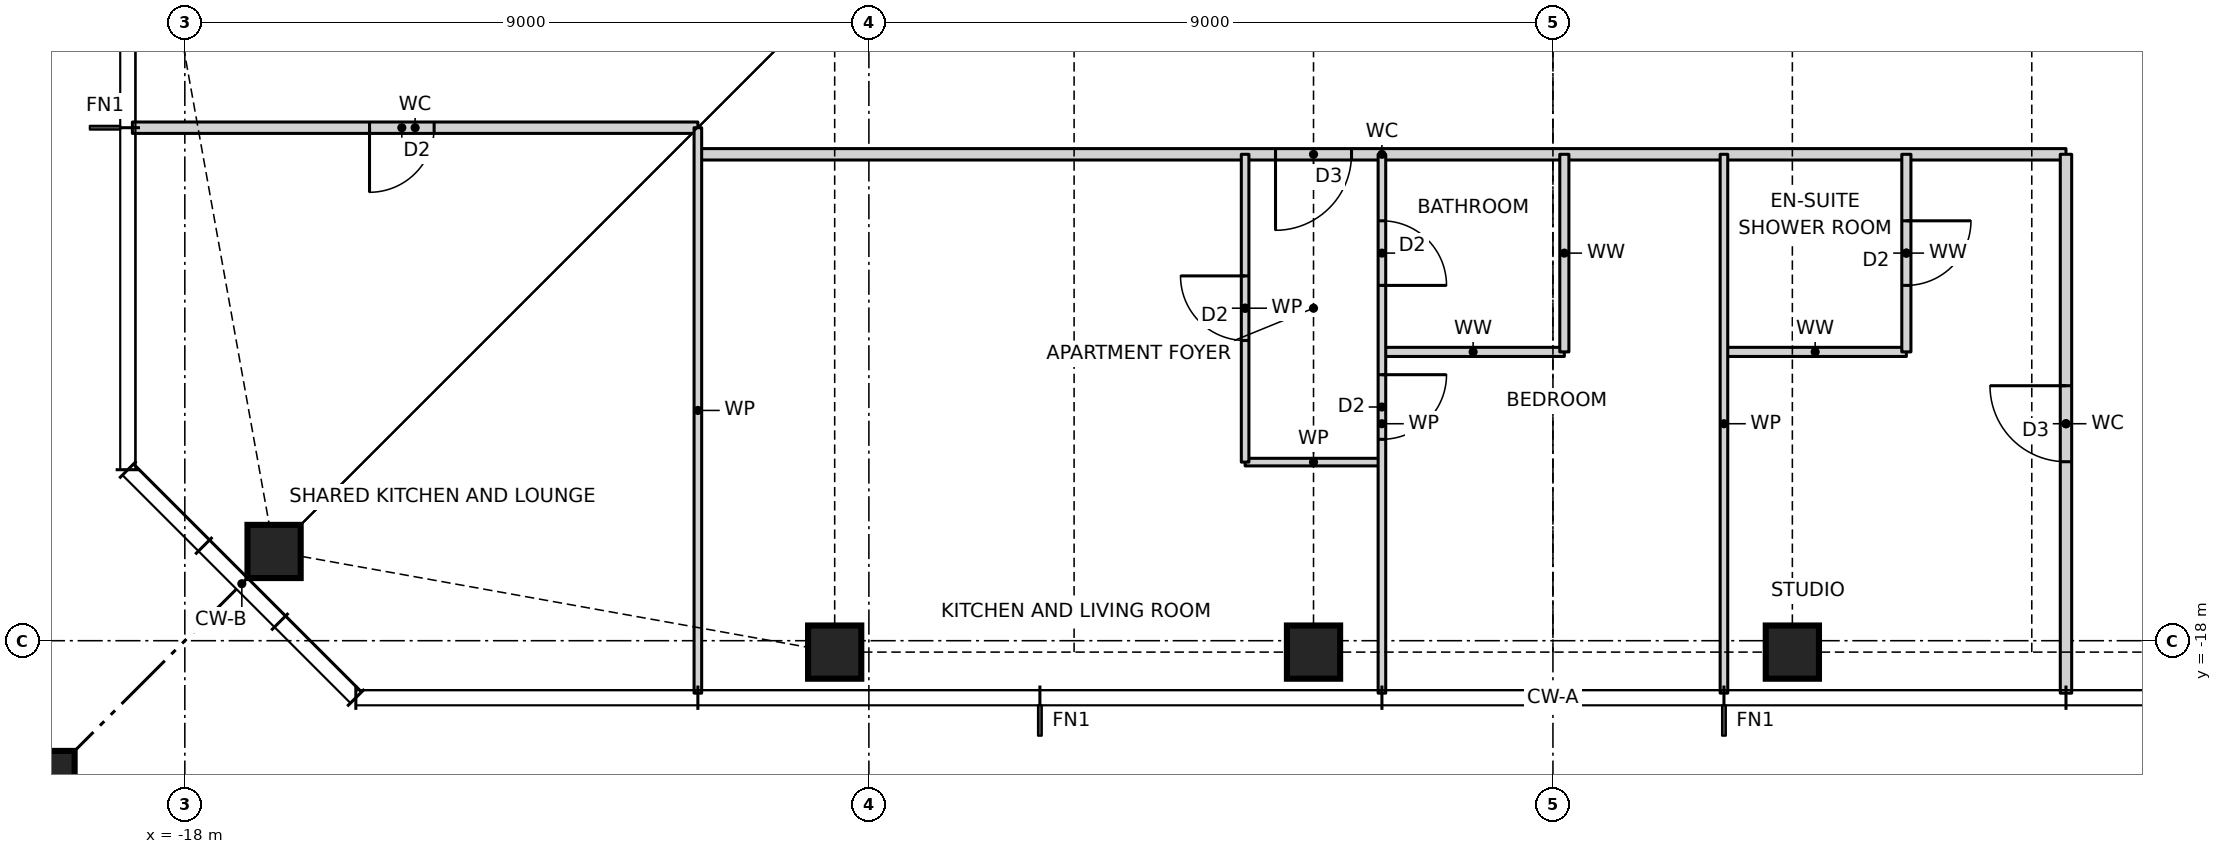
"""IFC4 building model, lengths in metres.
Left out: names, types, materials, properties, quantities, classifications, styles, units other than length and angle.
Written with IfcOpenShell. Run it as: python <this file> out.ifc"""

import sys

from ifc_helpers import new_model, si_unit, direction, frame, frame_2d, origin, origin_2d, place, context, subcontext, project, spatial, rectangle, hollow_rectangle, i_section, extrude, element, fill, save


model = new_model("IFC4")
c1 = context("Model", 3, precision=1e-05, world=origin(), true_north=direction((0.0, 1.0)))
c2 = subcontext(c1, "Body", "Model", "MODEL_VIEW")
j1 = project(units=[si_unit("LENGTHUNIT", "METRE"), si_unit("PLANEANGLEUNIT", "RADIAN")], contexts=[c1])
p1 = place(None, origin())
s1 = spatial("IfcSite", under=j1, at=p1, CompositionType="ELEMENT")
p2 = place(p1, origin())
s2 = spatial("IfcBuilding", under=s1, at=p2, CompositionType="ELEMENT")
p3 = place(p2, frame((0.0, 0.0, 167.0)))
s3 = spatial("IfcBuildingStorey", under=s2, at=p3, CompositionType="ELEMENT", Elevation=167.0)
for number, where, z_axis, x_axis in (
    (1, (-16.826, -16.826, 0.0), (0.0, 0.0, 1.0), (1.0, 0.0, 0.0)),
    (2, (-9.45, -18.15, 0.0), (0.0, 0.0, 1.0), (1.0, 0.0, 0.0)),
    (3, (-3.15, -18.15, 0.0), (0.0, 0.0, 1.0), (1.0, 0.0, 0.0)),
    (4, (3.15, -18.15, 0.0), (0.0, 0.0, 1.0), (1.0, 0.0, 0.0)),
):
    element("IfcColumn", number, at=place(p3, frame(where, z_axis=z_axis, x_axis=x_axis)), inside=s3, PredefinedType="COLUMN", context=c2, shape_type="SweptSolid", body=[
        extrude(hollow_rectangle(XDim=0.7, YDim=0.7, WallThickness=0.06, at=origin_2d()), origin(), (0.0, 0.0, 1.0), 3.5),
    ])
p4 = place(p3, frame((-21.65, -21.65, 0.0), z_axis=(0.0, 0.0, 1.0), x_axis=(1.0, 0.0, 0.0)))
e5 = element("IfcColumn", 5, at=p4, inside=s3, PredefinedType="COLUMN", context=c2, shape_type="SweptSolid", body=[
    extrude(rectangle(XDim=4.4, YDim=4.4, at=origin_2d()), origin(), (0.0, 0.0, 1.0), 3.5),
    extrude(i_section(OverallWidth=0.478, OverallDepth=0.599, WebThickness=0.1, FlangeThickness=0.14, at=origin_2d()), origin(), (0.0, 0.0, 1.0), 3.5),
])
p5 = place(p3, frame((-4.05, -15.65, 0.0), z_axis=(0.0, 0.0, 1.0), x_axis=(1.0, 0.0, 0.0)))
e6 = element("IfcWall", 6, at=p5, inside=s3, PredefinedType="PARTITIONING", context=c2, shape_type="SweptSolid", body=[
    extrude(rectangle(XDim=1.8, YDim=0.1, at=frame_2d((0.9, 0.0))), origin(), (0.0, 0.0, 1.0), 3.27),
])
for number, where, z_axis, x_axis in (
    (7, (-2.25, -14.2, 0.0), (0.0, 0.0, 1.0), (1.0, 0.0, 0.0)),
    (8, (2.25, -14.2, 0.0), (0.0, 0.0, 1.0), (1.0, 0.0, 0.0)),
):
    element("IfcWall", number, at=place(p3, frame(where, z_axis=z_axis, x_axis=x_axis)), inside=s3, PredefinedType="PARTITIONING", context=c2, shape_type="SweptSolid", body=[
        extrude(rectangle(XDim=2.4, YDim=0.12, at=frame_2d((1.2, 0.0))), origin(), (0.0, 0.0, 1.0), 3.27),
    ])
p6 = place(p3, frame((-11.25, -11.6, 0.0), z_axis=(0.0, 0.0, 1.0), x_axis=(1.0, 0.0, 0.0)))
e9 = element("IfcWall", 9, at=p6, inside=s3, PredefinedType="PARTITIONING", context=c2, shape_type="SweptSolid", body=[
    extrude(rectangle(XDim=18.0, YDim=0.15, at=frame_2d((9.0, 0.0))), origin(), (0.0, 0.0, 1.0), 3.27),
])
p7 = place(p6, frame((7.6, 0.0, 0.0)))
e10 = element("IfcOpeningElement", 10, at=p7, cuts=e9, PredefinedType="OPENING", context=c2, shape_type="SweptSolid", body=[
    extrude(rectangle(XDim=1.0, YDim=2.1, at=frame_2d((0.5, 1.05))), frame((0.0, 0.085, 0.0), z_axis=(0.0, -1.0, 0.0), x_axis=(1.0, 0.0, 0.0)), (0.0, 0.0, 1.0), 0.17),
])
p8 = place(p3, frame((-18.69, -11.25, 0.0), z_axis=(0.0, 0.0, 1.0), x_axis=(1.0, 0.0, 0.0)))
e11 = element("IfcWall", 11, at=p8, inside=s3, PredefinedType="PARTITIONING", context=c2, shape_type="SweptSolid", body=[
    extrude(rectangle(XDim=7.44, YDim=0.15, at=frame_2d((3.72, 0.0))), origin(), (0.0, 0.0, 1.0), 3.27),
])
p9 = place(p8, frame((3.12, 0.0, 0.0)))
e12 = element("IfcOpeningElement", 12, at=p9, cuts=e11, PredefinedType="OPENING", context=c2, shape_type="SweptSolid", body=[
    extrude(rectangle(XDim=0.85, YDim=2.1, at=frame_2d((0.425, 1.05))), frame((0.0, 0.085, 0.0), z_axis=(0.0, -1.0, 0.0), x_axis=(1.0, 0.0, 0.0)), (0.0, 0.0, 1.0), 0.17),
])
p10 = place(p3, frame((6.75, -18.69, 0.0), z_axis=(0.0, 0.0, 1.0), x_axis=(0.0, 1.0, 0.0)))
e13 = element("IfcWall", 13, at=p10, inside=s3, PredefinedType="PARTITIONING", context=c2, shape_type="SweptSolid", body=[
    extrude(rectangle(XDim=7.09, YDim=0.15, at=frame_2d((3.545, 0.0))), origin(), (0.0, 0.0, 1.0), 3.27),
])
p11 = place(p10, frame((3.045, 0.0, 0.0)))
e14 = element("IfcOpeningElement", 14, at=p11, cuts=e13, PredefinedType="OPENING", context=c2, shape_type="SweptSolid", body=[
    extrude(rectangle(XDim=1.0, YDim=2.1, at=frame_2d((0.5, 1.05))), frame((0.0, 0.085, 0.0), z_axis=(0.0, -1.0, 0.0), x_axis=(1.0, 0.0, 0.0)), (0.0, 0.0, 1.0), 0.17),
])
p12 = place(p3, frame((4.65, -14.2, 0.0), z_axis=(0.0, 0.0, 1.0), x_axis=(0.0, 1.0, 0.0)))
e15 = element("IfcWall", 15, at=p12, inside=s3, PredefinedType="PARTITIONING", context=c2, shape_type="SweptSolid", body=[
    extrude(rectangle(XDim=2.6, YDim=0.12, at=frame_2d((1.3, 0.0))), origin(), (0.0, 0.0, 1.0), 3.27),
])
p13 = place(p12, frame((0.875, 0.0, 0.0)))
e16 = element("IfcOpeningElement", 16, at=p13, cuts=e15, PredefinedType="OPENING", context=c2, shape_type="SweptSolid", body=[
    extrude(rectangle(XDim=0.85, YDim=2.1, at=frame_2d((0.425, 1.05))), frame((0.0, 0.07, 0.0), z_axis=(0.0, -1.0, 0.0), x_axis=(1.0, 0.0, 0.0)), (0.0, 0.0, 1.0), 0.14),
])
p14 = place(p3, frame((2.25, -18.69, 0.0), z_axis=(0.0, 0.0, 1.0), x_axis=(0.0, 1.0, 0.0)))
e17 = element("IfcWall", 17, at=p14, inside=s3, PredefinedType="PARTITIONING", context=c2, shape_type="SweptSolid", body=[
    extrude(rectangle(XDim=7.09, YDim=0.1, at=frame_2d((3.545, 0.0))), origin(), (0.0, 0.0, 1.0), 3.27),
])
p15 = place(p3, frame((0.15, -14.2, 0.0), z_axis=(0.0, 0.0, 1.0), x_axis=(0.0, 1.0, 0.0)))
e18 = element("IfcWall", 18, at=p15, inside=s3, PredefinedType="PARTITIONING", context=c2, shape_type="SweptSolid", body=[
    extrude(rectangle(XDim=2.6, YDim=0.12, at=frame_2d((1.3, 0.0))), origin(), (0.0, 0.0, 1.0), 3.27),
])
p16 = place(p3, frame((-2.25, -18.69, 0.0), z_axis=(0.0, 0.0, 1.0), x_axis=(0.0, 1.0, 0.0)))
e19 = element("IfcWall", 19, at=p16, inside=s3, PredefinedType="PARTITIONING", context=c2, shape_type="SweptSolid", body=[
    extrude(rectangle(XDim=7.09, YDim=0.1, at=frame_2d((3.545, 0.0))), origin(), (0.0, 0.0, 1.0), 3.27),
])
p17 = place(p16, frame((3.34, 0.0, 0.0)))
e20 = element("IfcOpeningElement", 20, at=p17, cuts=e19, PredefinedType="OPENING", context=c2, shape_type="SweptSolid", body=[
    extrude(rectangle(XDim=0.85, YDim=2.1, at=frame_2d((0.425, 1.05))), frame((0.0, 0.06, 0.0), z_axis=(0.0, -1.0, 0.0), x_axis=(1.0, 0.0, 0.0)), (0.0, 0.0, 1.0), 0.12),
])
p18 = place(p16, frame((5.365, 0.0, 0.0)))
e21 = element("IfcOpeningElement", 21, at=p18, cuts=e19, PredefinedType="OPENING", context=c2, shape_type="SweptSolid", body=[
    extrude(rectangle(XDim=0.85, YDim=2.1, at=frame_2d((0.425, 1.05))), frame((0.0, 0.06, 0.0), z_axis=(0.0, -1.0, 0.0), x_axis=(1.0, 0.0, 0.0)), (0.0, 0.0, 1.0), 0.12),
])
p19 = place(p3, frame((-4.05, -15.65, 0.0), z_axis=(0.0, 0.0, 1.0), x_axis=(0.0, 1.0, 0.0)))
e22 = element("IfcWall", 22, at=p19, inside=s3, PredefinedType="PARTITIONING", context=c2, shape_type="SweptSolid", body=[
    extrude(rectangle(XDim=4.05, YDim=0.1, at=frame_2d((2.025, 0.0))), origin(), (0.0, 0.0, 1.0), 3.27),
])
p20 = place(p19, frame((1.6, 0.0, 0.0)))
e23 = element("IfcOpeningElement", 23, at=p20, cuts=e22, PredefinedType="OPENING", context=c2, shape_type="SweptSolid", body=[
    extrude(rectangle(XDim=0.85, YDim=2.1, at=frame_2d((0.425, 1.05))), frame((0.0, 0.06, 0.0), z_axis=(0.0, -1.0, 0.0), x_axis=(1.0, 0.0, 0.0)), (0.0, 0.0, 1.0), 0.12),
])
p21 = place(p3, frame((-11.25, -18.69, 0.0), z_axis=(0.0, 0.0, 1.0), x_axis=(0.0, 1.0, 0.0)))
e24 = element("IfcWall", 24, at=p21, inside=s3, PredefinedType="PARTITIONING", context=c2, shape_type="SweptSolid", body=[
    extrude(rectangle(XDim=7.44, YDim=0.1, at=frame_2d((3.72, 0.0))), origin(), (0.0, 0.0, 1.0), 3.27),
])
p22 = place(p7, frame((1.0, 0.0, 0.0), z_axis=(0.0, 0.0, 1.0), x_axis=(-1.0, 0.0, 0.0)))
e25 = element("IfcDoor", 25, at=p22, inside=s3, OperationType="SINGLE_SWING_RIGHT", PredefinedType="DOOR", context=c2, shape_type="SweptSolid", body=[
    extrude(rectangle(XDim=1.0, YDim=2.1, at=frame_2d((0.5, 1.05))), frame((0.0, 0.025, 0.0), z_axis=(0.0, -1.0, 0.0), x_axis=(1.0, 0.0, 0.0)), (0.0, 0.0, 1.0), 0.05),
])
fill(e10, e25)
p23 = place(p20, origin())
e26 = element("IfcDoor", 26, at=p23, inside=s3, OperationType="SINGLE_SWING_RIGHT", PredefinedType="DOOR", context=c2, shape_type="SweptSolid", body=[
    extrude(rectangle(XDim=0.85, YDim=2.1, at=frame_2d((0.425, 1.05))), frame((0.0, 0.025, 0.0), z_axis=(0.0, -1.0, 0.0), x_axis=(1.0, 0.0, 0.0)), (0.0, 0.0, 1.0), 0.05),
])
fill(e23, e26)
p24 = place(p17, frame((0.85, 0.0, 0.0), z_axis=(0.0, 0.0, 1.0), x_axis=(-1.0, 0.0, 0.0)))
e27 = element("IfcDoor", 27, at=p24, inside=s3, OperationType="SINGLE_SWING_LEFT", PredefinedType="DOOR", context=c2, shape_type="SweptSolid", body=[
    extrude(rectangle(XDim=0.85, YDim=2.1, at=frame_2d((0.425, 1.05))), frame((0.0, 0.025, 0.0), z_axis=(0.0, -1.0, 0.0), x_axis=(1.0, 0.0, 0.0)), (0.0, 0.0, 1.0), 0.05),
])
fill(e20, e27)
p25 = place(p18, frame((0.85, 0.0, 0.0), z_axis=(0.0, 0.0, 1.0), x_axis=(-1.0, 0.0, 0.0)))
e28 = element("IfcDoor", 28, at=p25, inside=s3, OperationType="SINGLE_SWING_RIGHT", PredefinedType="DOOR", context=c2, shape_type="SweptSolid", body=[
    extrude(rectangle(XDim=0.85, YDim=2.1, at=frame_2d((0.425, 1.05))), frame((0.0, 0.025, 0.0), z_axis=(0.0, -1.0, 0.0), x_axis=(1.0, 0.0, 0.0)), (0.0, 0.0, 1.0), 0.05),
])
fill(e21, e28)
p26 = place(p11, origin())
e29 = element("IfcDoor", 29, at=p26, inside=s3, OperationType="SINGLE_SWING_RIGHT", PredefinedType="DOOR", context=c2, shape_type="SweptSolid", body=[
    extrude(rectangle(XDim=1.0, YDim=2.1, at=frame_2d((0.5, 1.05))), frame((0.0, 0.025, 0.0), z_axis=(0.0, -1.0, 0.0), x_axis=(1.0, 0.0, 0.0)), (0.0, 0.0, 1.0), 0.05),
])
fill(e14, e29)
p27 = place(p13, frame((0.85, 0.0, 0.0), z_axis=(0.0, 0.0, 1.0), x_axis=(-1.0, 0.0, 0.0)))
e30 = element("IfcDoor", 30, at=p27, inside=s3, OperationType="SINGLE_SWING_LEFT", PredefinedType="DOOR", context=c2, shape_type="SweptSolid", body=[
    extrude(rectangle(XDim=0.85, YDim=2.1, at=frame_2d((0.425, 1.05))), frame((0.0, 0.025, 0.0), z_axis=(0.0, -1.0, 0.0), x_axis=(1.0, 0.0, 0.0)), (0.0, 0.0, 1.0), 0.05),
])
fill(e16, e30)
p28 = place(p9, frame((0.85, 0.0, 0.0), z_axis=(0.0, 0.0, 1.0), x_axis=(-1.0, 0.0, 0.0)))
e31 = element("IfcDoor", 31, at=p28, inside=s3, OperationType="SINGLE_SWING_RIGHT", PredefinedType="DOOR", context=c2, shape_type="SweptSolid", body=[
    extrude(rectangle(XDim=0.85, YDim=2.1, at=frame_2d((0.425, 1.05))), frame((0.0, 0.025, 0.0), z_axis=(0.0, -1.0, 0.0), x_axis=(1.0, 0.0, 0.0)), (0.0, 0.0, 1.0), 0.05),
])
fill(e12, e31)
save(model, sys.argv[1])
